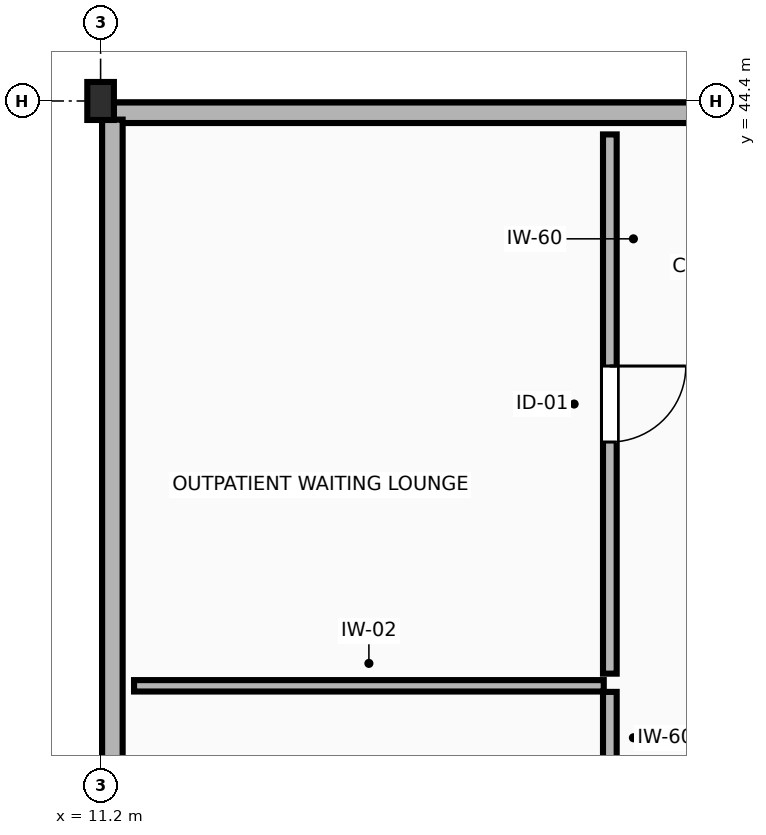
"""IFC4 building model, lengths in metres.
Left out: names, types, materials, properties, quantities, classifications, styles, units other than length and angle.
Written with IfcOpenShell. Run it as: python <this file> out.ifc"""

import sys

from ifc_helpers import new_model, si_unit, direction, frame, frame_2d, origin, origin_2d, place, context, subcontext, project, spatial, rectangle, extrude, element, fill, save


model = new_model("IFC4")
c1 = context("Model", 3, precision=1e-05, world=origin(), true_north=direction((0.0, 1.0)))
c2 = subcontext(c1, "Body", "Model", "MODEL_VIEW")
j1 = project(units=[si_unit("LENGTHUNIT", "METRE"), si_unit("PLANEANGLEUNIT", "RADIAN")], contexts=[c1])
p1 = place(None, origin())
s1 = spatial("IfcSite", under=j1, at=p1, CompositionType="ELEMENT")
p2 = place(p1, origin())
s2 = spatial("IfcBuilding", under=s1, at=p2, CompositionType="ELEMENT")
p3 = place(p2, frame((0.0, 0.0, 9.6)))
s3 = spatial("IfcBuildingStorey", under=s2, at=p3, CompositionType="ELEMENT", Elevation=9.6)
p4 = place(p3, frame((11.2, 44.4, 0.0), z_axis=(0.0, 0.0, 1.0), x_axis=(1.0, 0.0, 0.0)))
e1 = element("IfcColumn", 1, at=p4, inside=s3, PredefinedType="COLUMN", context=c2, shape_type="SweptSolid", body=[
    extrude(rectangle(XDim=0.35, YDim=0.5, at=origin_2d()), origin(), (0.0, 0.0, 1.0), 4.2),
])
p5 = place(p3, frame((19.305, 44.245, 0.0), z_axis=(0.0, 0.0, 1.0), x_axis=(-1.0, 0.0, 0.0)))
e2 = element("IfcWall", 2, at=p5, inside=s3, PredefinedType="STANDARD", context=c2, shape_type="SweptSolid", body=[
    extrude(rectangle(XDim=7.935, YDim=0.27, at=frame_2d((3.967, 0.0))), origin(), (0.0, 0.0, 1.0), 3.255),
])
p6 = place(p3, frame((11.355, 44.155, 0.0), z_axis=(0.0, 0.0, 1.0), x_axis=(0.0, -1.0, 0.0)))
e3 = element("IfcWall", 3, at=p6, inside=s3, PredefinedType="STANDARD", context=c2, shape_type="SweptSolid", body=[
    extrude(rectangle(XDim=9.31, YDim=0.27, at=frame_2d((4.655, 0.0))), origin(), (0.0, 0.0, 1.0), 3.265),
])
p7 = place(p3, frame((11.64, 36.705, 0.0), z_axis=(0.0, 0.0, 1.0), x_axis=(1.0, 0.0, 0.0)))
e4 = element("IfcWall", 4, at=p7, inside=s3, PredefinedType="PARTITIONING", context=c2, shape_type="SweptSolid", body=[
    extrude(rectangle(XDim=6.18, YDim=0.15, at=frame_2d((3.09, 0.0))), origin(), (0.0, 0.0, 1.0), 3.92),
])
p8 = place(p3, frame((17.9, 36.625, 0.0), z_axis=(0.0, 0.0, 1.0), x_axis=(0.0, -1.0, 0.0)))
e5 = element("IfcWall", 5, at=p8, inside=s3, PredefinedType="PARTITIONING", context=c2, shape_type="SweptSolid", body=[
    extrude(rectangle(XDim=7.095, YDim=0.18, at=frame_2d((3.547, 0.0))), origin(), (0.0, 0.0, 1.0), 3.92),
])
p9 = place(p8, frame((1.508, 0.0, 0.0)))
e6 = element("IfcOpeningElement", 6, at=p9, cuts=e5, PredefinedType="OPENING", context=c2, shape_type="SweptSolid", body=[
    extrude(rectangle(XDim=1.08, YDim=2.2, at=frame_2d((0.54, 1.1))), frame((0.0, 0.1, 0.0), z_axis=(0.0, -1.0, 0.0), x_axis=(1.0, 0.0, 0.0)), (0.0, 0.0, 1.0), 0.2),
])
p10 = place(p3, frame((17.9, 43.96, 0.0), z_axis=(0.0, 0.0, 1.0), x_axis=(0.0, -1.0, 0.0)))
e7 = element("IfcWall", 7, at=p10, inside=s3, PredefinedType="PARTITIONING", context=c2, shape_type="SweptSolid", body=[
    extrude(rectangle(XDim=7.095, YDim=0.18, at=frame_2d((3.547, 0.0))), origin(), (0.0, 0.0, 1.0), 3.92),
])
p11 = place(p10, frame((3.048, 0.0, 0.0)))
e8 = element("IfcOpeningElement", 8, at=p11, cuts=e7, PredefinedType="OPENING", context=c2, shape_type="SweptSolid", body=[
    extrude(rectangle(XDim=1.0, YDim=2.15, at=frame_2d((0.5, 1.075))), frame((0.0, 0.1, 0.0), z_axis=(0.0, -1.0, 0.0), x_axis=(1.0, 0.0, 0.0)), (0.0, 0.0, 1.0), 0.2),
])
p12 = place(p11, origin())
e9 = element("IfcDoor", 9, at=p12, inside=s3, OperationType="SINGLE_SWING_LEFT", PredefinedType="DOOR", context=c2, shape_type="SweptSolid", body=[
    extrude(rectangle(XDim=1.0, YDim=2.15, at=frame_2d((0.5, 1.075))), frame((0.0, 0.025, 0.0), z_axis=(0.0, -1.0, 0.0), x_axis=(1.0, 0.0, 0.0)), (0.0, 0.0, 1.0), 0.05),
])
fill(e8, e9)
save(model, sys.argv[1])
